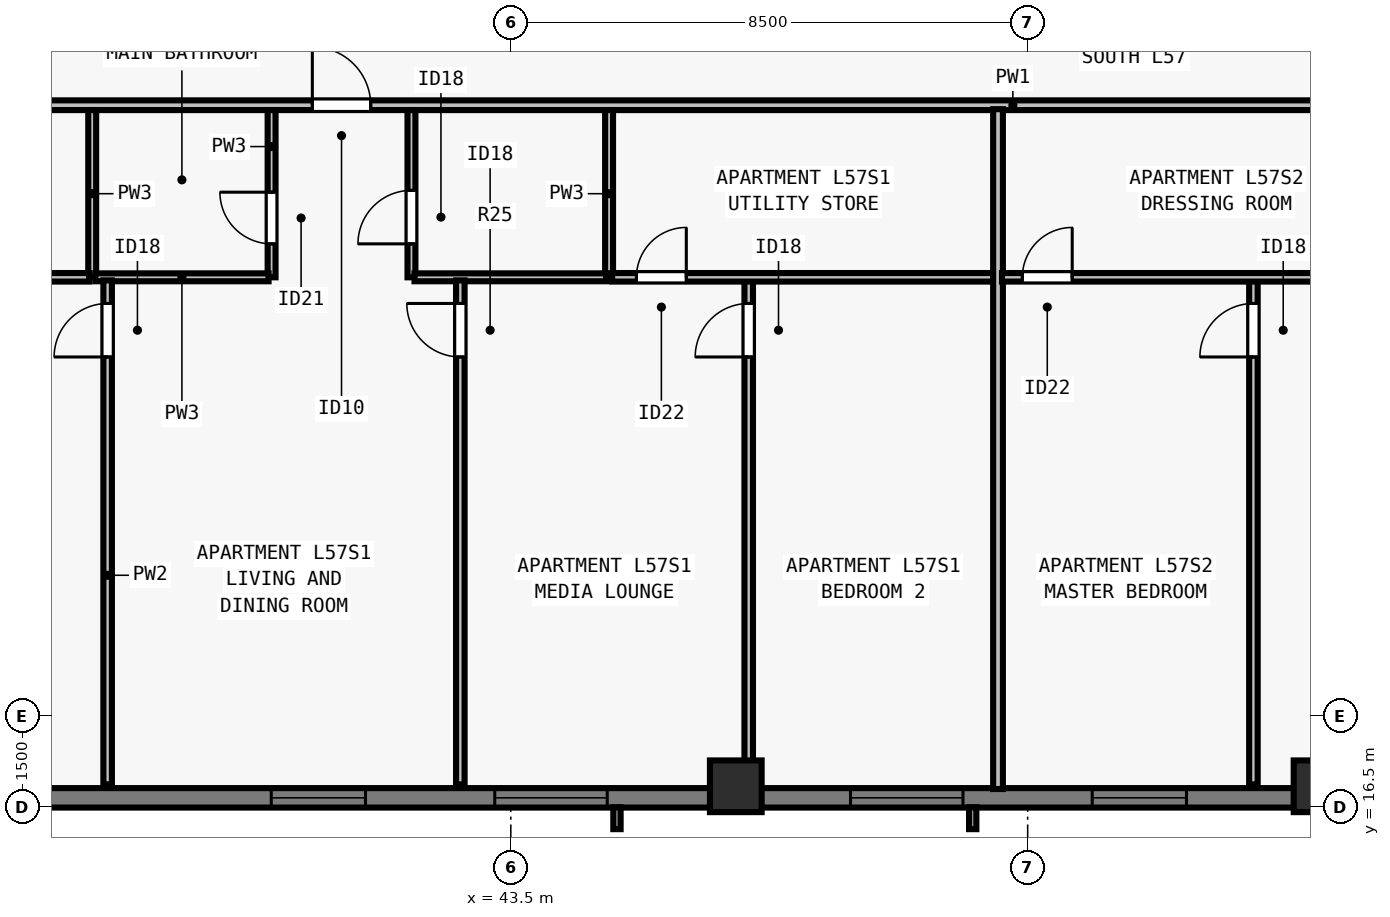
"""IFC4 building model, lengths in metres.
Left out: names, types, materials, properties, quantities, classifications, styles, units other than length and angle.
Written with IfcOpenShell. Run it as: python <this file> out.ifc"""

import sys

from ifc_helpers import new_model, si_unit, direction, frame, frame_2d, origin, origin_2d, place, context, subcontext, project, spatial, rectangle, extrude, element, fill, save


model = new_model("IFC4")
c1 = context("Model", 3, precision=1e-05, world=origin(), true_north=direction((0.0, 1.0)))
c2 = subcontext(c1, "Body", "Model", "MODEL_VIEW")
j1 = project(units=[si_unit("LENGTHUNIT", "METRE"), si_unit("PLANEANGLEUNIT", "RADIAN")], contexts=[c1])
p1 = place(None, origin())
s1 = spatial("IfcSite", under=j1, at=p1, CompositionType="ELEMENT")
p2 = place(p1, origin())
s2 = spatial("IfcBuilding", under=s1, at=p2, CompositionType="ELEMENT")
p3 = place(p2, frame((0.0, 0.0, 209.5)))
s3 = spatial("IfcBuildingStorey", under=s2, at=p3, CompositionType="ELEMENT", Elevation=209.5)
for number, where, z_axis, x_axis in (
    (1, (47.2, 16.85, 0.0), (0.0, 0.0, 1.0), (1.0, 0.0, 0.0)),
    (2, (56.8, 16.85, 0.0), (0.0, 0.0, 1.0), (1.0, 0.0, 0.0)),
):
    element("IfcColumn", number, at=place(p3, frame(where, z_axis=z_axis, x_axis=x_axis)), inside=s3, PredefinedType="COLUMN", context=c2, shape_type="SweptSolid", body=[
        extrude(rectangle(XDim=0.85, YDim=0.85, at=origin_2d()), origin(), (0.0, 0.0, 1.0), 3.5),
    ])
p4 = place(p3, frame((69.5, 16.66, 0.0), z_axis=(0.0, 0.0, 1.0), x_axis=(-1.0, 0.0, 0.0)))
e3 = element("IfcWall", 3, at=p4, inside=s3, PredefinedType="SOLIDWALL", context=c2, shape_type="SweptSolid", body=[
    extrude(rectangle(XDim=34.702, YDim=0.32, at=frame_2d((17.351, 0.0))), origin(), (0.0, 0.0, 1.0), 3.29),
])
p5 = place(p4, frame((5.863, 0.0, 0.8)))
e4 = element("IfcOpeningElement", 4, at=p5, cuts=e3, PredefinedType="OPENING", context=c2, shape_type="SweptSolid", body=[
    extrude(rectangle(XDim=1.85, YDim=1.678, at=frame_2d((0.925, 0.839))), frame((0.0, 0.17, 0.0), z_axis=(0.0, -1.0, 0.0), x_axis=(1.0, 0.0, 0.0)), (0.0, 0.0, 1.0), 0.34),
])
p6 = place(p4, frame((8.138, 0.0, 0.8)))
e5 = element("IfcOpeningElement", 5, at=p6, cuts=e3, PredefinedType="OPENING", context=c2, shape_type="SweptSolid", body=[
    extrude(rectangle(XDim=1.55, YDim=1.678, at=frame_2d((0.775, 0.839))), frame((0.0, 0.17, 0.0), z_axis=(0.0, -1.0, 0.0), x_axis=(1.0, 0.0, 0.0)), (0.0, 0.0, 1.0), 0.34),
])
p7 = place(p4, frame((10.113, 0.0, 0.8)))
e6 = element("IfcOpeningElement", 6, at=p7, cuts=e3, PredefinedType="OPENING", context=c2, shape_type="SweptSolid", body=[
    extrude(rectangle(XDim=1.85, YDim=1.678, at=frame_2d((0.925, 0.839))), frame((0.0, 0.17, 0.0), z_axis=(0.0, -1.0, 0.0), x_axis=(1.0, 0.0, 0.0)), (0.0, 0.0, 1.0), 0.34),
])
p8 = place(p4, frame((14.888, 0.0, 0.8)))
e7 = element("IfcOpeningElement", 7, at=p8, cuts=e3, PredefinedType="OPENING", context=c2, shape_type="SweptSolid", body=[
    extrude(rectangle(XDim=1.55, YDim=1.678, at=frame_2d((0.775, 0.839))), frame((0.0, 0.17, 0.0), z_axis=(0.0, -1.0, 0.0), x_axis=(1.0, 0.0, 0.0)), (0.0, 0.0, 1.0), 0.34),
])
p9 = place(p4, frame((18.564, 0.0, 0.8)))
e8 = element("IfcOpeningElement", 8, at=p9, cuts=e3, PredefinedType="OPENING", context=c2, shape_type="SweptSolid", body=[
    extrude(rectangle(XDim=1.85, YDim=1.678, at=frame_2d((0.925, 0.839))), frame((0.0, 0.17, 0.0), z_axis=(0.0, -1.0, 0.0), x_axis=(1.0, 0.0, 0.0)), (0.0, 0.0, 1.0), 0.34),
])
p10 = place(p4, frame((24.414, 0.0, 0.8)))
e9 = element("IfcOpeningElement", 9, at=p10, cuts=e3, PredefinedType="OPENING", context=c2, shape_type="SweptSolid", body=[
    extrude(rectangle(XDim=1.85, YDim=1.678, at=frame_2d((0.925, 0.839))), frame((0.0, 0.17, 0.0), z_axis=(0.0, -1.0, 0.0), x_axis=(1.0, 0.0, 0.0)), (0.0, 0.0, 1.0), 0.34),
])
p11 = place(p4, frame((28.389, 0.0, 0.8)))
e10 = element("IfcOpeningElement", 10, at=p11, cuts=e3, PredefinedType="OPENING", context=c2, shape_type="SweptSolid", body=[
    extrude(rectangle(XDim=1.55, YDim=1.678, at=frame_2d((0.775, 0.839))), frame((0.0, 0.17, 0.0), z_axis=(0.0, -1.0, 0.0), x_axis=(1.0, 0.0, 0.0)), (0.0, 0.0, 1.0), 0.34),
])
p12 = place(p3, frame((29.805, 28.05, 0.0), z_axis=(0.0, 0.0, 1.0), x_axis=(1.0, 0.0, 0.0)))
e11 = element("IfcWall", 11, at=p12, inside=s3, PredefinedType="PARTITIONING", context=c2, shape_type="SweptSolid", body=[
    extrude(rectangle(XDim=44.39, YDim=0.16, at=frame_2d((22.195, 0.0))), origin(), (0.0, 0.0, 1.0), 2.958),
])
p13 = place(p12, frame((10.431, 0.0, 0.0)))
e12 = element("IfcOpeningElement", 12, at=p13, cuts=e11, PredefinedType="OPENING", context=c2, shape_type="SweptSolid", body=[
    extrude(rectangle(XDim=0.96, YDim=2.18, at=frame_2d((0.48, 1.09))), frame((0.0, 0.09, 0.0), z_axis=(0.0, -1.0, 0.0), x_axis=(1.0, 0.0, 0.0)), (0.0, 0.0, 1.0), 0.18),
])
p14 = place(p12, frame((32.511, 0.0, 0.0)))
e13 = element("IfcOpeningElement", 13, at=p14, cuts=e11, PredefinedType="OPENING", context=c2, shape_type="SweptSolid", body=[
    extrude(rectangle(XDim=0.96, YDim=2.18, at=frame_2d((0.48, 1.09))), frame((0.0, 0.09, 0.0), z_axis=(0.0, -1.0, 0.0), x_axis=(1.0, 0.0, 0.0)), (0.0, 0.0, 1.0), 0.18),
])
p15 = place(p3, frame((36.616, 25.22, 0.0), z_axis=(0.0, 0.0, 1.0), x_axis=(0.0, 1.0, 0.0)))
e14 = element("IfcWall", 14, at=p15, inside=s3, PredefinedType="PLUMBINGWALL", context=c2, shape_type="SweptSolid", body=[
    extrude(rectangle(XDim=2.75, YDim=0.13, at=frame_2d((1.375, 0.0))), origin(), (0.0, 0.0, 1.0), 3.29),
])
p16 = place(p3, frame((39.566, 25.22, 0.0), z_axis=(0.0, 0.0, 1.0), x_axis=(0.0, 1.0, 0.0)))
e15 = element("IfcWall", 15, at=p16, inside=s3, PredefinedType="PLUMBINGWALL", context=c2, shape_type="SweptSolid", body=[
    extrude(rectangle(XDim=2.75, YDim=0.13, at=frame_2d((1.375, 0.0))), origin(), (0.0, 0.0, 1.0), 3.29),
])
p17 = place(p16, frame((0.55, 0.0, 0.0)))
e16 = element("IfcOpeningElement", 16, at=p17, cuts=e15, PredefinedType="OPENING", context=c2, shape_type="SweptSolid", body=[
    extrude(rectangle(XDim=0.85, YDim=2.08, at=frame_2d((0.425, 1.04))), frame((0.0, 0.075, 0.0), z_axis=(0.0, -1.0, 0.0), x_axis=(1.0, 0.0, 0.0)), (0.0, 0.0, 1.0), 0.15),
])
p18 = place(p3, frame((36.666, 25.22, 0.0), z_axis=(0.0, 0.0, 1.0), x_axis=(1.0, 0.0, 0.0)))
e17 = element("IfcWall", 17, at=p18, inside=s3, PredefinedType="PLUMBINGWALL", context=c2, shape_type="SweptSolid", body=[
    extrude(rectangle(XDim=2.85, YDim=0.13, at=frame_2d((1.425, 0.0))), origin(), (0.0, 0.0, 1.0), 3.29),
])
p19 = place(p3, frame((45.116, 25.22, 0.0), z_axis=(0.0, 0.0, 1.0), x_axis=(0.0, 1.0, 0.0)))
e18 = element("IfcWall", 18, at=p19, inside=s3, PredefinedType="PLUMBINGWALL", context=c2, shape_type="SweptSolid", body=[
    extrude(rectangle(XDim=2.75, YDim=0.13, at=frame_2d((1.375, 0.0))), origin(), (0.0, 0.0, 1.0), 3.29),
])
p20 = place(p3, frame((41.866, 25.22, 0.0), z_axis=(0.0, 0.0, 1.0), x_axis=(0.0, 1.0, 0.0)))
e19 = element("IfcWall", 19, at=p20, inside=s3, PredefinedType="PLUMBINGWALL", context=c2, shape_type="SweptSolid", body=[
    extrude(rectangle(XDim=2.75, YDim=0.13, at=frame_2d((1.375, 0.0))), origin(), (0.0, 0.0, 1.0), 2.573),
])
p21 = place(p20, frame((0.55, 0.0, 0.0)))
e20 = element("IfcOpeningElement", 20, at=p21, cuts=e19, PredefinedType="OPENING", context=c2, shape_type="SweptSolid", body=[
    extrude(rectangle(XDim=0.88, YDim=2.1, at=frame_2d((0.44, 1.05))), frame((0.0, 0.075, 0.0), z_axis=(0.0, -1.0, 0.0), x_axis=(1.0, 0.0, 0.0)), (0.0, 0.0, 1.0), 0.15),
])
p22 = place(p3, frame((41.916, 25.22, 0.0), z_axis=(0.0, 0.0, 1.0), x_axis=(1.0, 0.0, 0.0)))
e21 = element("IfcWall", 21, at=p22, inside=s3, PredefinedType="PLUMBINGWALL", context=c2, shape_type="SweptSolid", body=[
    extrude(rectangle(XDim=3.15, YDim=0.13, at=frame_2d((1.575, 0.0))), origin(), (0.0, 0.0, 1.0), 3.29),
])
p23 = place(p3, frame((36.87, 16.88, 0.0), z_axis=(0.0, 0.0, 1.0), x_axis=(0.0, 1.0, 0.0)))
e22 = element("IfcWall", 22, at=p23, inside=s3, PredefinedType="PARTITIONING", context=c2, shape_type="SweptSolid", body=[
    extrude(rectangle(XDim=8.29, YDim=0.14, at=frame_2d((4.145, 0.0))), origin(), (0.0, 0.0, 1.0), 2.573),
])
p24 = place(p23, frame((7.03, 0.0, 0.0)))
e23 = element("IfcOpeningElement", 23, at=p24, cuts=e22, PredefinedType="OPENING", context=c2, shape_type="SweptSolid", body=[
    extrude(rectangle(XDim=0.88, YDim=2.1, at=frame_2d((0.44, 1.05))), frame((0.0, 0.08, 0.0), z_axis=(0.0, -1.0, 0.0), x_axis=(1.0, 0.0, 0.0)), (0.0, 0.0, 1.0), 0.16),
])
p25 = place(p3, frame((29.87, 25.22, 0.0), z_axis=(0.0, 0.0, 1.0), x_axis=(1.0, 0.0, 0.0)))
e24 = element("IfcWall", 24, at=p25, inside=s3, PredefinedType="PARTITIONING", context=c2, shape_type="SweptSolid", body=[
    extrude(rectangle(XDim=6.696, YDim=0.14, at=frame_2d((3.348, 0.0))), origin(), (0.0, 0.0, 1.0), 2.958),
])
p26 = place(p25, frame((0.45, 0.0, 0.0)))
e25 = element("IfcOpeningElement", 25, at=p26, cuts=e24, PredefinedType="OPENING", context=c2, shape_type="SweptSolid", body=[
    extrude(rectangle(XDim=0.82, YDim=2.1, at=frame_2d((0.41, 1.05))), frame((0.0, 0.08, 0.0), z_axis=(0.0, -1.0, 0.0), x_axis=(1.0, 0.0, 0.0)), (0.0, 0.0, 1.0), 0.16),
])
p27 = place(p3, frame((47.413, 16.88, 0.0), z_axis=(0.0, 0.0, 1.0), x_axis=(0.0, 1.0, 0.0)))
e26 = element("IfcWall", 26, at=p27, inside=s3, PredefinedType="PARTITIONING", context=c2, shape_type="SweptSolid", body=[
    extrude(rectangle(XDim=8.38, YDim=0.14, at=frame_2d((4.19, 0.0))), origin(), (0.0, 0.0, 1.0), 2.573),
])
p28 = place(p27, frame((7.03, 0.0, 0.0)))
e27 = element("IfcOpeningElement", 27, at=p28, cuts=e26, PredefinedType="OPENING", context=c2, shape_type="SweptSolid", body=[
    extrude(rectangle(XDim=0.88, YDim=2.1, at=frame_2d((0.44, 1.05))), frame((0.0, 0.08, 0.0), z_axis=(0.0, -1.0, 0.0), x_axis=(1.0, 0.0, 0.0)), (0.0, 0.0, 1.0), 0.16),
])
p29 = place(p3, frame((45.166, 25.22, 0.0), z_axis=(0.0, 0.0, 1.0), x_axis=(1.0, 0.0, 0.0)))
e28 = element("IfcWall", 28, at=p29, inside=s3, PredefinedType="PARTITIONING", context=c2, shape_type="SweptSolid", body=[
    extrude(rectangle(XDim=6.396, YDim=0.14, at=frame_2d((3.198, 0.0))), origin(), (0.0, 0.0, 1.0), 3.29),
])
p30 = place(p29, frame((0.4, 0.0, 0.0)))
e29 = element("IfcOpeningElement", 29, at=p30, cuts=e28, PredefinedType="OPENING", context=c2, shape_type="SweptSolid", body=[
    extrude(rectangle(XDim=0.82, YDim=2.1, at=frame_2d((0.41, 1.05))), frame((0.0, 0.08, 0.0), z_axis=(0.0, -1.0, 0.0), x_axis=(1.0, 0.0, 0.0)), (0.0, 0.0, 1.0), 0.16),
])
p31 = place(p3, frame((42.67, 16.88, 0.0), z_axis=(0.0, 0.0, 1.0), x_axis=(0.0, 1.0, 0.0)))
e30 = element("IfcWall", 30, at=p31, inside=s3, PredefinedType="PARTITIONING", context=c2, shape_type="SweptSolid", body=[
    extrude(rectangle(XDim=8.29, YDim=0.14, at=frame_2d((4.145, 0.0))), origin(), (0.0, 0.0, 1.0), 3.29),
])
p32 = place(p31, frame((7.03, 0.0, 0.0)))
e31 = element("IfcOpeningElement", 31, at=p32, cuts=e30, PredefinedType="OPENING", context=c2, shape_type="SweptSolid", body=[
    extrude(rectangle(XDim=0.88, YDim=2.1, at=frame_2d((0.44, 1.05))), frame((0.0, 0.08, 0.0), z_axis=(0.0, -1.0, 0.0), x_axis=(1.0, 0.0, 0.0)), (0.0, 0.0, 1.0), 0.16),
])
p33 = place(p3, frame((51.512, 16.805, 0.0), z_axis=(0.0, 0.0, 1.0), x_axis=(0.0, 1.0, 0.0)))
e32 = element("IfcWall", 32, at=p33, inside=s3, PredefinedType="PARTITIONING", context=c2, shape_type="SweptSolid", body=[
    extrude(rectangle(XDim=11.18, YDim=0.16, at=frame_2d((5.59, 0.0))), origin(), (0.0, 0.0, 1.0), 2.958),
])
p34 = place(p3, frame((55.712, 16.88, 0.0), z_axis=(0.0, 0.0, 1.0), x_axis=(0.0, 1.0, 0.0)))
e33 = element("IfcWall", 33, at=p34, inside=s3, PredefinedType="PARTITIONING", context=c2, shape_type="SweptSolid", body=[
    extrude(rectangle(XDim=8.38, YDim=0.14, at=frame_2d((4.19, 0.0))), origin(), (0.0, 0.0, 1.0), 3.29),
])
p35 = place(p34, frame((7.03, 0.0, 0.0)))
e34 = element("IfcOpeningElement", 34, at=p35, cuts=e33, PredefinedType="OPENING", context=c2, shape_type="SweptSolid", body=[
    extrude(rectangle(XDim=0.88, YDim=2.1, at=frame_2d((0.44, 1.05))), frame((0.0, 0.08, 0.0), z_axis=(0.0, -1.0, 0.0), x_axis=(1.0, 0.0, 0.0)), (0.0, 0.0, 1.0), 0.16),
])
p36 = place(p3, frame((51.577, 25.22, 0.0), z_axis=(0.0, 0.0, 1.0), x_axis=(1.0, 0.0, 0.0)))
e35 = element("IfcWall", 35, at=p36, inside=s3, PredefinedType="PARTITIONING", context=c2, shape_type="SweptSolid", body=[
    extrude(rectangle(XDim=7.069, YDim=0.14, at=frame_2d((3.534, 0.0))), origin(), (0.0, 0.0, 1.0), 3.29),
])
p37 = place(p36, frame((0.335, 0.0, 0.0)))
e36 = element("IfcOpeningElement", 36, at=p37, cuts=e35, PredefinedType="OPENING", context=c2, shape_type="SweptSolid", body=[
    extrude(rectangle(XDim=0.82, YDim=2.1, at=frame_2d((0.41, 1.05))), frame((0.0, 0.08, 0.0), z_axis=(0.0, -1.0, 0.0), x_axis=(1.0, 0.0, 0.0)), (0.0, 0.0, 1.0), 0.16),
])
p38 = place(p8, origin())
e37 = element("IfcWindow", 37, at=p38, inside=s3, PartitioningType="SINGLE_PANEL", PredefinedType="WINDOW", context=c2, shape_type="SweptSolid", body=[
    extrude(rectangle(XDim=1.55, YDim=1.678, at=frame_2d((0.775, 0.839))), frame((0.0, -0.05, 0.0), z_axis=(0.0, -1.0, 0.0), x_axis=(1.0, 0.0, 0.0)), (0.0, 0.0, 1.0), 0.06),
])
fill(e7, e37)
p39 = place(p9, origin())
e38 = element("IfcWindow", 38, at=p39, inside=s3, PartitioningType="SINGLE_PANEL", PredefinedType="WINDOW", context=c2, shape_type="SweptSolid", body=[
    extrude(rectangle(XDim=1.85, YDim=1.678, at=frame_2d((0.925, 0.839))), frame((0.0, -0.05, 0.0), z_axis=(0.0, -1.0, 0.0), x_axis=(1.0, 0.0, 0.0)), (0.0, 0.0, 1.0), 0.06),
])
fill(e8, e38)
p40 = place(p10, origin())
e39 = element("IfcWindow", 39, at=p40, inside=s3, PartitioningType="SINGLE_PANEL", PredefinedType="WINDOW", context=c2, shape_type="SweptSolid", body=[
    extrude(rectangle(XDim=1.85, YDim=1.678, at=frame_2d((0.925, 0.839))), frame((0.0, -0.05, 0.0), z_axis=(0.0, -1.0, 0.0), x_axis=(1.0, 0.0, 0.0)), (0.0, 0.0, 1.0), 0.06),
])
fill(e9, e39)
p41 = place(p11, origin())
e40 = element("IfcWindow", 40, at=p41, inside=s3, PartitioningType="SINGLE_PANEL", PredefinedType="WINDOW", context=c2, shape_type="SweptSolid", body=[
    extrude(rectangle(XDim=1.55, YDim=1.678, at=frame_2d((0.775, 0.839))), frame((0.0, -0.05, 0.0), z_axis=(0.0, -1.0, 0.0), x_axis=(1.0, 0.0, 0.0)), (0.0, 0.0, 1.0), 0.06),
])
fill(e10, e40)
p42 = place(p17, origin())
e41 = element("IfcDoor", 41, at=p42, inside=s3, OperationType="SINGLE_SWING_RIGHT", PredefinedType="DOOR", context=c2, shape_type="SweptSolid", body=[
    extrude(rectangle(XDim=0.85, YDim=2.08, at=frame_2d((0.425, 1.04))), frame((0.0, 0.025, 0.0), z_axis=(0.0, -1.0, 0.0), x_axis=(1.0, 0.0, 0.0)), (0.0, 0.0, 1.0), 0.05),
])
fill(e16, e41)
p43 = place(p21, origin())
e42 = element("IfcDoor", 42, at=p43, inside=s3, OperationType="SINGLE_SWING_LEFT", PredefinedType="DOOR", context=c2, shape_type="SweptSolid", body=[
    extrude(rectangle(XDim=0.88, YDim=2.1, at=frame_2d((0.44, 1.05))), frame((0.0, 0.025, 0.0), z_axis=(0.0, -1.0, 0.0), x_axis=(1.0, 0.0, 0.0)), (0.0, 0.0, 1.0), 0.05),
])
fill(e20, e42)
p44 = place(p24, origin())
e43 = element("IfcDoor", 43, at=p44, inside=s3, OperationType="SINGLE_SWING_LEFT", PredefinedType="DOOR", context=c2, shape_type="SweptSolid", body=[
    extrude(rectangle(XDim=0.88, YDim=2.1, at=frame_2d((0.44, 1.05))), frame((0.0, 0.025, 0.0), z_axis=(0.0, -1.0, 0.0), x_axis=(1.0, 0.0, 0.0)), (0.0, 0.0, 1.0), 0.05),
])
fill(e23, e43)
p45 = place(p30, origin())
e44 = element("IfcDoor", 44, at=p45, inside=s3, OperationType="SINGLE_SWING_RIGHT", PredefinedType="DOOR", context=c2, shape_type="SweptSolid", body=[
    extrude(rectangle(XDim=0.82, YDim=2.1, at=frame_2d((0.41, 1.05))), frame((0.0, 0.025, 0.0), z_axis=(0.0, -1.0, 0.0), x_axis=(1.0, 0.0, 0.0)), (0.0, 0.0, 1.0), 0.05),
])
fill(e29, e44)
p46 = place(p28, origin())
e45 = element("IfcDoor", 45, at=p46, inside=s3, OperationType="SINGLE_SWING_LEFT", PredefinedType="DOOR", context=c2, shape_type="SweptSolid", body=[
    extrude(rectangle(XDim=0.88, YDim=2.1, at=frame_2d((0.44, 1.05))), frame((0.0, 0.025, 0.0), z_axis=(0.0, -1.0, 0.0), x_axis=(1.0, 0.0, 0.0)), (0.0, 0.0, 1.0), 0.05),
])
fill(e27, e45)
p47 = place(p32, origin())
e46 = element("IfcDoor", 46, at=p47, inside=s3, OperationType="SINGLE_SWING_RIGHT", PredefinedType="DOOR", context=c2, shape_type="SweptSolid", body=[
    extrude(rectangle(XDim=0.88, YDim=2.1, at=frame_2d((0.44, 1.05))), frame((0.0, 0.025, 0.0), z_axis=(0.0, -1.0, 0.0), x_axis=(1.0, 0.0, 0.0)), (0.0, 0.0, 1.0), 0.05),
])
fill(e31, e46)
p48 = place(p13, origin())
e47 = element("IfcDoor", 47, at=p48, inside=s3, OperationType="SINGLE_SWING_LEFT", PredefinedType="DOOR", context=c2, shape_type="SweptSolid", body=[
    extrude(rectangle(XDim=0.96, YDim=2.18, at=frame_2d((0.48, 1.09))), frame((0.0, 0.025, 0.0), z_axis=(0.0, -1.0, 0.0), x_axis=(1.0, 0.0, 0.0)), (0.0, 0.0, 1.0), 0.05),
])
fill(e12, e47)
p49 = place(p37, origin())
e48 = element("IfcDoor", 48, at=p49, inside=s3, OperationType="SINGLE_SWING_RIGHT", PredefinedType="DOOR", context=c2, shape_type="SweptSolid", body=[
    extrude(rectangle(XDim=0.82, YDim=2.1, at=frame_2d((0.41, 1.05))), frame((0.0, 0.025, 0.0), z_axis=(0.0, -1.0, 0.0), x_axis=(1.0, 0.0, 0.0)), (0.0, 0.0, 1.0), 0.05),
])
fill(e36, e48)
p50 = place(p35, origin())
e49 = element("IfcDoor", 49, at=p50, inside=s3, OperationType="SINGLE_SWING_LEFT", PredefinedType="DOOR", context=c2, shape_type="SweptSolid", body=[
    extrude(rectangle(XDim=0.88, YDim=2.1, at=frame_2d((0.44, 1.05))), frame((0.0, 0.025, 0.0), z_axis=(0.0, -1.0, 0.0), x_axis=(1.0, 0.0, 0.0)), (0.0, 0.0, 1.0), 0.05),
])
fill(e34, e49)
save(model, sys.argv[1])
